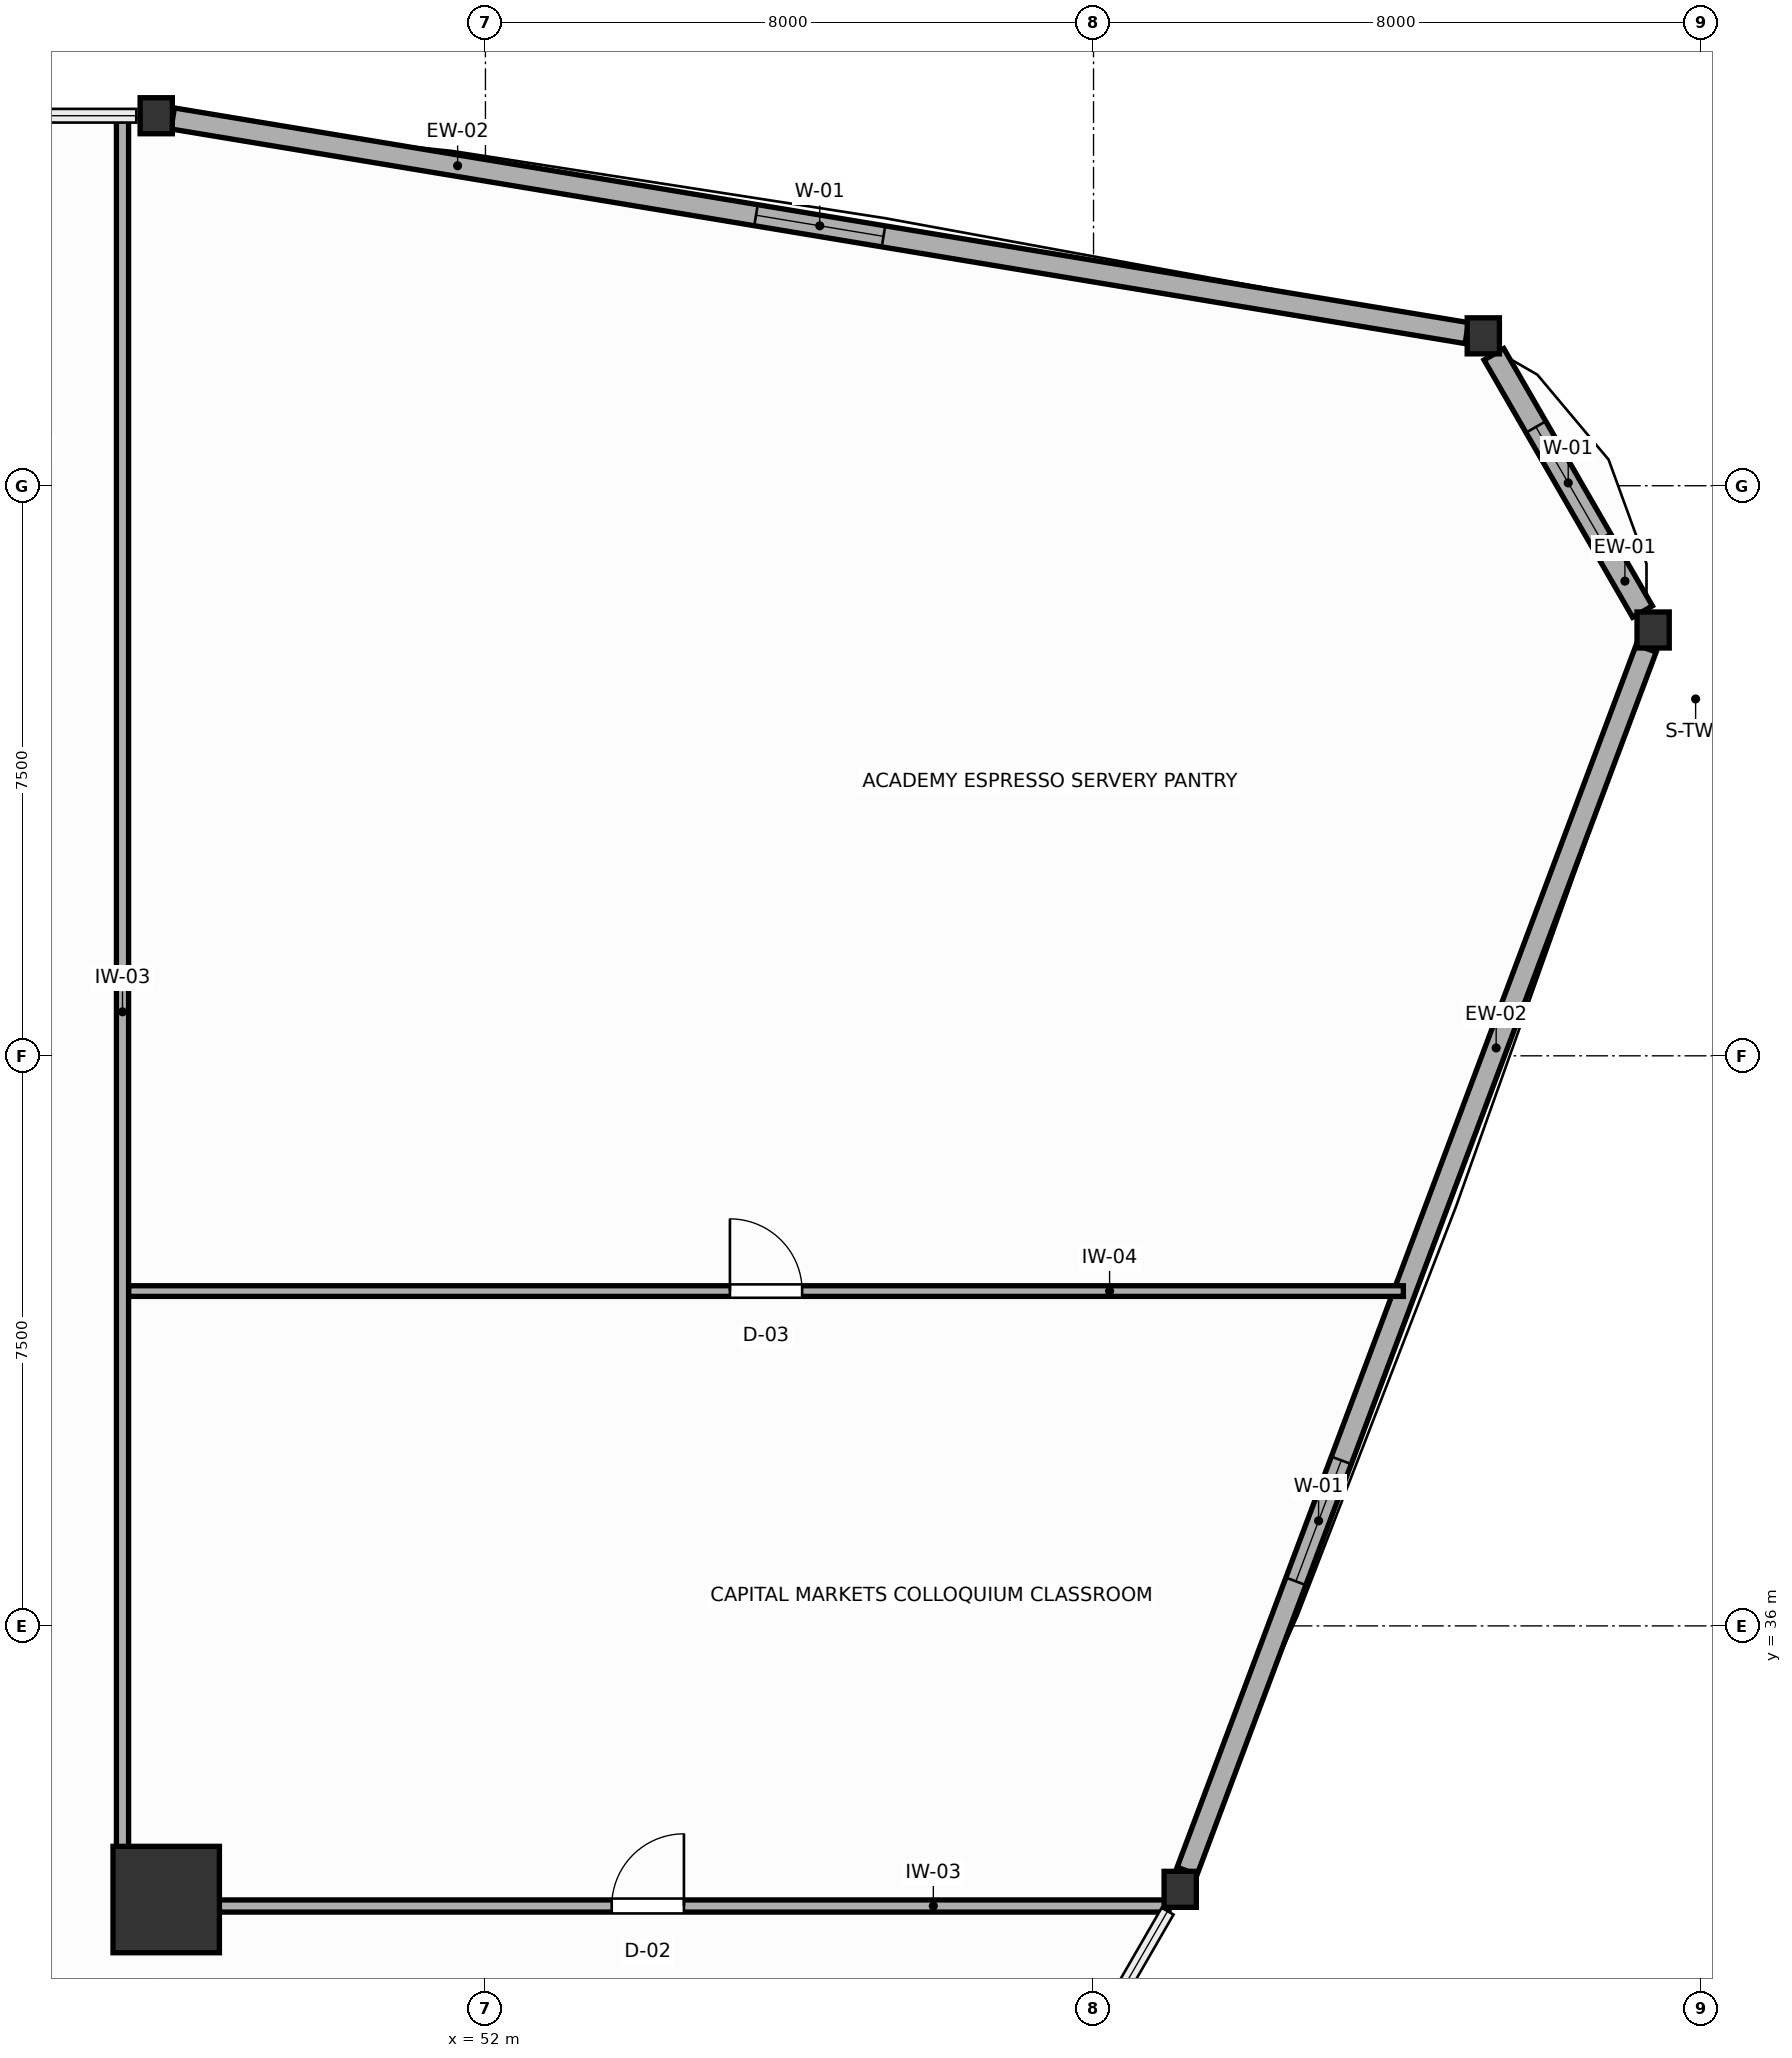
"""IFC4 building model, lengths in metres.
Left out: names, types, materials, properties, quantities, classifications, styles, units other than length and angle.
Written with IfcOpenShell. Run it as: python <this file> out.ifc"""

import sys

from ifc_helpers import new_model, si_unit, direction, frame, frame_2d, origin, origin_2d, place, context, subcontext, project, spatial, rectangle, i_section, extrude, source, transform, mapped, element, fill, save


model = new_model("IFC4")
c1 = context("Model", 3, precision=1e-05, world=origin(), true_north=direction((0.0, 1.0)))
c2 = subcontext(c1, "Body", "Model", "MODEL_VIEW")
j1 = project(units=[si_unit("LENGTHUNIT", "METRE"), si_unit("PLANEANGLEUNIT", "RADIAN")], contexts=[c1])
p1 = place(None, origin())
s1 = spatial("IfcSite", under=j1, at=p1, CompositionType="ELEMENT")
p2 = place(p1, origin())
s2 = spatial("IfcBuilding", under=s1, at=p2, CompositionType="ELEMENT")
p3 = place(p2, frame((0.0, 0.0, 79.5)))
s3 = spatial("IfcBuildingStorey", under=s2, at=p3, CompositionType="ELEMENT", Elevation=79.5)
m1 = source(origin(), c2, "Body", "SweptSolid", [
    extrude(rectangle(XDim=1.4, YDim=1.4, at=origin_2d()), origin(), (0.0, 0.0, 1.0), 3.9),
])
p4 = place(p3, frame((47.8, 32.4, 0.0), z_axis=(0.0, 0.0, 1.0), x_axis=(1.0, 0.0, 0.0)))
e1 = element("IfcColumn", 1, at=p4, inside=s3, PredefinedType="COLUMN", context=c2, shape_type="MappedRepresentation", body=[
    mapped(m1, transform((0.0, 0.0, 0.0), scale=1.0)),
])
m2 = source(origin(), c2, "Body", "SweptSolid", [
    extrude(i_section(OverallWidth=0.424, OverallDepth=0.474, WebThickness=0.045, FlangeThickness=0.072, FilletRadius=0.015, at=origin_2d()), origin(), (0.0, 0.0, 1.0), 3.9),
])
for number, where, z_axis, x_axis in (
    (2, (67.362, 49.102, 0.0), (0.0, 0.0, 1.0), (1.0, 0.0, 0.0)),
    (3, (65.128, 52.972, 0.0), (0.0, 0.0, 1.0), (1.0, 0.0, 0.0)),
    (4, (47.669, 55.868, 0.0), (0.0, 0.0, 1.0), (1.0, 0.0, 0.0)),
    (5, (61.14, 32.534, 0.0), (0.0, 0.0, 1.0), (1.0, 0.0, 0.0)),
):
    element("IfcColumn", number, at=place(p3, frame(where, z_axis=z_axis, x_axis=x_axis)), inside=s3, PredefinedType="COLUMN", context=c2, shape_type="MappedRepresentation", body=[
        mapped(m2, transform((0.0, 0.0, 0.0), scale=1.0)),
    ])
p5 = place(p3, frame((67.222, 49.344, 0.0), z_axis=(0.0, 0.0, 1.0), x_axis=(-0.500014353419, 0.866017116675, 0.0)))
e6 = element("IfcWall", 6, at=p5, inside=s3, PredefinedType="SOLIDWALL", context=c2, shape_type="SweptSolid", body=[
    extrude(rectangle(XDim=3.91, YDim=0.3, at=frame_2d((1.955, 0.0))), origin(), (0.0, 0.0, 1.0), 3.23),
])
p6 = place(p5, frame((1.105, 0.0, 0.75)))
e7 = element("IfcOpeningElement", 7, at=p6, cuts=e6, PredefinedType="OPENING", context=c2, shape_type="SweptSolid", body=[
    extrude(rectangle(XDim=1.7, YDim=1.75, at=frame_2d((0.85, 0.875))), frame((0.0, 0.16, 0.0), z_axis=(0.0, -1.0, 0.0), x_axis=(1.0, 0.0, 0.0)), (0.0, 0.0, 1.0), 0.32),
])
p7 = place(p3, frame((64.911, 53.008, 0.0), z_axis=(0.0, 0.0, 1.0), x_axis=(-0.986523232029, 0.163621247604, 0.0)))
e8 = element("IfcWall", 8, at=p7, inside=s3, PredefinedType="SOLIDWALL", context=c2, shape_type="SweptSolid", body=[
    extrude(rectangle(XDim=17.258, YDim=0.28, at=frame_2d((8.629, 0.0))), origin(), (0.0, 0.0, 1.0), 3.23),
])
p8 = place(p7, frame((7.779, 0.0, 0.75)))
e9 = element("IfcOpeningElement", 9, at=p8, cuts=e8, PredefinedType="OPENING", context=c2, shape_type="SweptSolid", body=[
    extrude(rectangle(XDim=1.7, YDim=1.75, at=frame_2d((0.85, 0.875))), frame((0.0, 0.15, 0.0), z_axis=(0.0, -1.0, 0.0), x_axis=(1.0, 0.0, 0.0)), (0.0, 0.0, 1.0), 0.3),
])
p9 = place(p3, frame((61.231, 32.776, 0.0), z_axis=(0.0, 0.0, 1.0), x_axis=(0.351559441404, 0.936165561832, 0.0)))
e10 = element("IfcWall", 10, at=p9, inside=s3, PredefinedType="SOLIDWALL", context=c2, shape_type="SweptSolid", body=[
    extrude(rectangle(XDim=17.181, YDim=0.28, at=frame_2d((8.59, 0.0))), origin(), (0.0, 0.0, 1.0), 3.23),
])
p10 = place(p9, frame((4.07, 0.0, 0.75)))
e11 = element("IfcOpeningElement", 11, at=p10, cuts=e10, PredefinedType="OPENING", context=c2, shape_type="SweptSolid", body=[
    extrude(rectangle(XDim=1.7, YDim=1.75, at=frame_2d((0.85, 0.875))), frame((0.0, 0.15, 0.0), z_axis=(0.0, -1.0, 0.0), x_axis=(1.0, 0.0, 0.0)), (0.0, 0.0, 1.0), 0.3),
])
p11 = place(p3, frame((47.225, 32.31, 0.0), z_axis=(0.0, 0.0, 1.0), x_axis=(0.0, 1.0, 0.0)))
e12 = element("IfcWall", 12, at=p11, inside=s3, PredefinedType="PARTITIONING", context=c2, shape_type="SweptSolid", body=[
    extrude(rectangle(XDim=23.538, YDim=0.16, at=frame_2d((11.769, 0.0))), origin(), (0.0, 0.0, 1.0), 3.18),
])
p12 = place(p3, frame((47.307, 32.315, 0.0), z_axis=(0.0, 0.0, 1.0), x_axis=(1.0, 0.0, 0.0)))
e13 = element("IfcWall", 13, at=p12, inside=s3, PredefinedType="PARTITIONING", context=c2, shape_type="SweptSolid", body=[
    extrude(rectangle(XDim=13.687, YDim=0.16, at=frame_2d((6.843, 0.0))), origin(), (0.0, 0.0, 1.0), 3.18),
])
p13 = place(p12, frame((6.354, 0.0, 0.0)))
e14 = element("IfcOpeningElement", 14, at=p13, cuts=e13, PredefinedType="OPENING", context=c2, shape_type="SweptSolid", body=[
    extrude(rectangle(XDim=0.95, YDim=2.05, at=frame_2d((0.475, 1.025))), frame((0.0, 0.09, 0.0), z_axis=(0.0, -1.0, 0.0), x_axis=(1.0, 0.0, 0.0)), (0.0, 0.0, 1.0), 0.18),
])
p14 = place(p3, frame((47.307, 40.405, 0.0), z_axis=(0.0, 0.0, 1.0), x_axis=(1.0, 0.0, 0.0)))
e15 = element("IfcWall", 15, at=p14, inside=s3, PredefinedType="PARTITIONING", context=c2, shape_type="SweptSolid", body=[
    extrude(rectangle(XDim=16.769, YDim=0.14, at=frame_2d((8.385, 0.0))), origin(), (0.0, 0.0, 1.0), 3.68),
])
p15 = place(p14, frame((7.909, 0.0, 0.0)))
e16 = element("IfcOpeningElement", 16, at=p15, cuts=e15, PredefinedType="OPENING", context=c2, shape_type="SweptSolid", body=[
    extrude(rectangle(XDim=0.95, YDim=2.05, at=frame_2d((0.475, 1.025))), frame((0.0, 0.08, 0.0), z_axis=(0.0, -1.0, 0.0), x_axis=(1.0, 0.0, 0.0)), (0.0, 0.0, 1.0), 0.16),
])
p16 = place(p6, origin())
e17 = element("IfcWindow", 17, at=p16, inside=s3, PartitioningType="SINGLE_PANEL", PredefinedType="WINDOW", context=c2, shape_type="SweptSolid", body=[
    extrude(rectangle(XDim=1.7, YDim=1.75, at=frame_2d((0.85, 0.875))), frame((0.0, 0.03, 0.0), z_axis=(0.0, -1.0, 0.0), x_axis=(1.0, 0.0, 0.0)), (0.0, 0.0, 1.0), 0.06),
])
fill(e7, e17)
p17 = place(p8, origin())
e18 = element("IfcWindow", 18, at=p17, inside=s3, PartitioningType="SINGLE_PANEL", PredefinedType="WINDOW", context=c2, shape_type="SweptSolid", body=[
    extrude(rectangle(XDim=1.7, YDim=1.75, at=frame_2d((0.85, 0.875))), frame((0.0, 0.03, 0.0), z_axis=(0.0, -1.0, 0.0), x_axis=(1.0, 0.0, 0.0)), (0.0, 0.0, 1.0), 0.06),
])
fill(e9, e18)
p18 = place(p10, origin())
e19 = element("IfcWindow", 19, at=p18, inside=s3, PartitioningType="SINGLE_PANEL", PredefinedType="WINDOW", context=c2, shape_type="SweptSolid", body=[
    extrude(rectangle(XDim=1.7, YDim=1.75, at=frame_2d((0.85, 0.875))), frame((0.0, 0.03, 0.0), z_axis=(0.0, -1.0, 0.0), x_axis=(1.0, 0.0, 0.0)), (0.0, 0.0, 1.0), 0.06),
])
fill(e11, e19)
p19 = place(p13, origin())
e20 = element("IfcDoor", 20, at=p19, inside=s3, OperationType="SINGLE_SWING_RIGHT", PredefinedType="DOOR", context=c2, shape_type="SweptSolid", body=[
    extrude(rectangle(XDim=0.95, YDim=2.05, at=frame_2d((0.475, 1.025))), frame((0.0, 0.025, 0.0), z_axis=(0.0, -1.0, 0.0), x_axis=(1.0, 0.0, 0.0)), (0.0, 0.0, 1.0), 0.05),
])
fill(e14, e20)
p20 = place(p15, origin())
e21 = element("IfcDoor", 21, at=p20, inside=s3, OperationType="SINGLE_SWING_LEFT", PredefinedType="DOOR", context=c2, shape_type="SweptSolid", body=[
    extrude(rectangle(XDim=0.95, YDim=2.05, at=frame_2d((0.475, 1.025))), frame((0.0, 0.025, 0.0), z_axis=(0.0, -1.0, 0.0), x_axis=(1.0, 0.0, 0.0)), (0.0, 0.0, 1.0), 0.05),
])
fill(e16, e21)
save(model, sys.argv[1])
